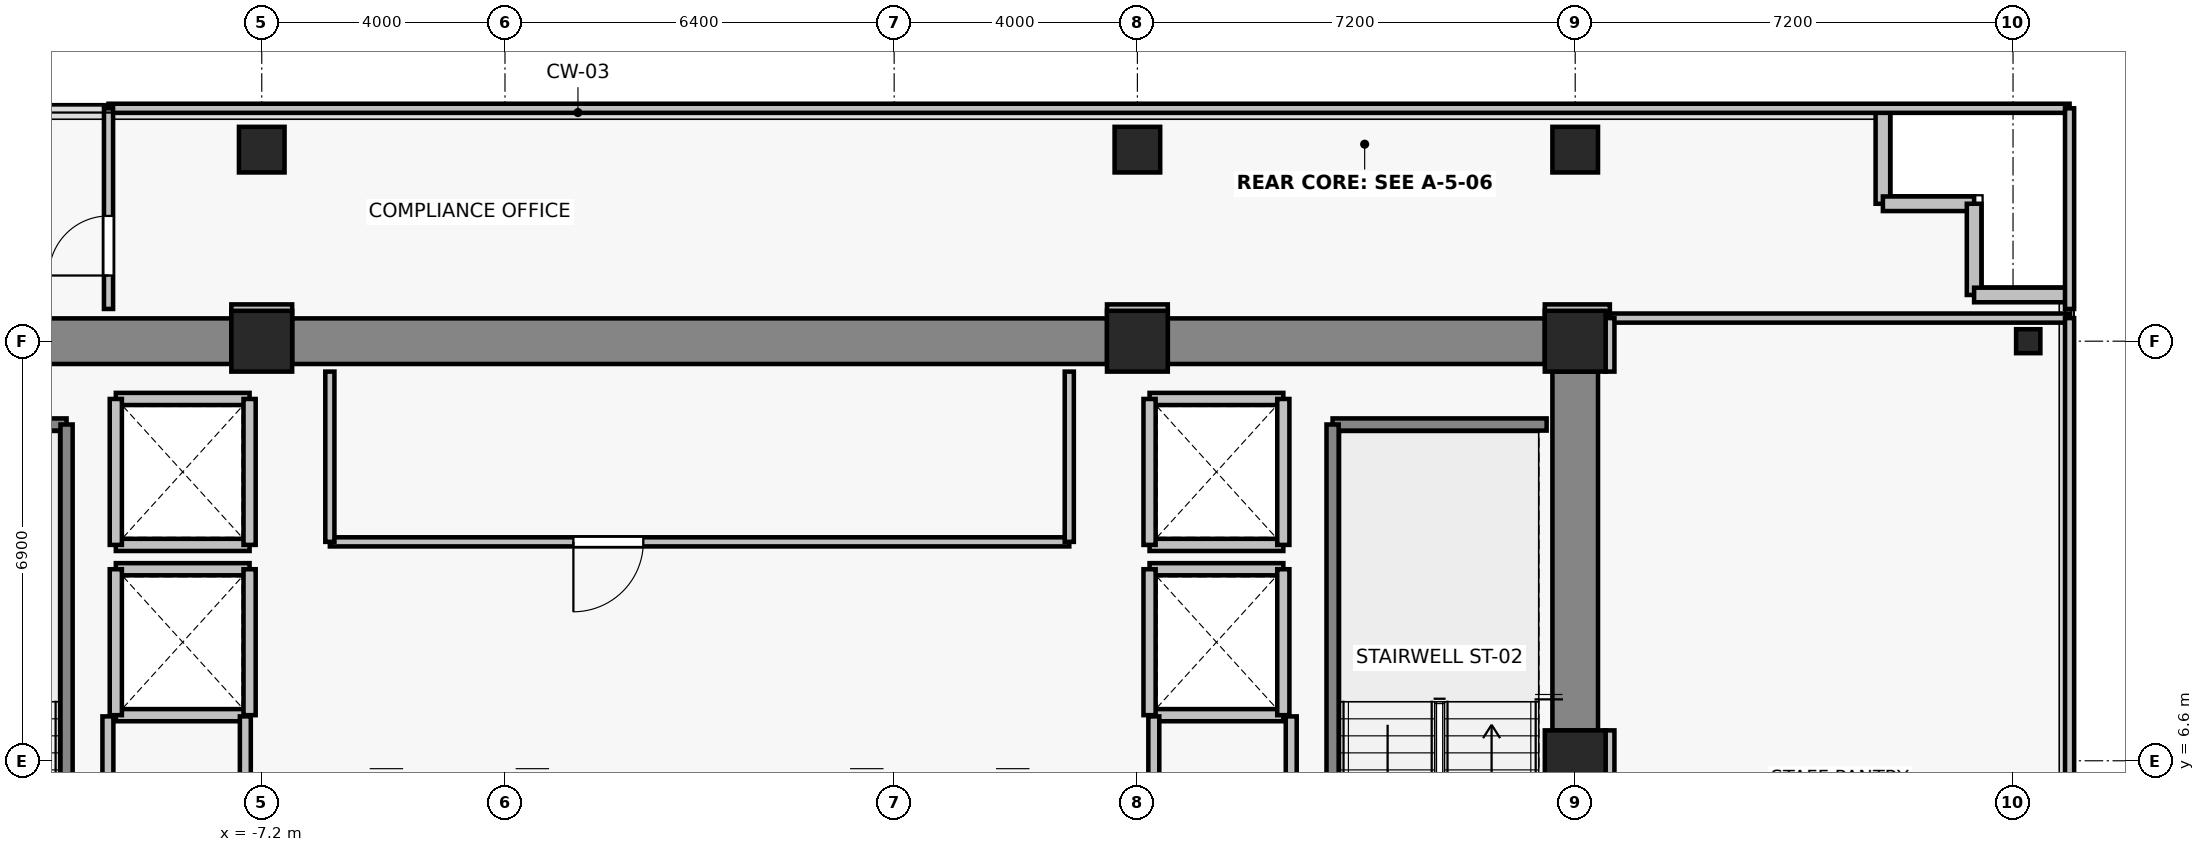
"""IFC4 building model, lengths in metres.
Left out: names, types, materials, properties, quantities, classifications, styles, units other than length and angle.
Written with IfcOpenShell. Run it as: python <this file> out.ifc"""

import sys

from ifc_helpers import new_model, si_unit, direction, frame, frame_2d, origin, origin_2d, place, context, subcontext, project, spatial, rectangle, i_section, extrude, source, transform, mapped, element, fill, save


model = new_model("IFC4")
c1 = context("Model", 3, precision=1e-05, world=origin(), true_north=direction((0.0, 1.0)))
c2 = subcontext(c1, "Body", "Model", "MODEL_VIEW")
j1 = project(units=[si_unit("LENGTHUNIT", "METRE"), si_unit("PLANEANGLEUNIT", "RADIAN")], contexts=[c1])
p1 = place(None, origin())
s1 = spatial("IfcSite", under=j1, at=p1, CompositionType="ELEMENT")
p2 = place(p1, origin())
s2 = spatial("IfcBuilding", under=s1, at=p2, CompositionType="ELEMENT")
p3 = place(p2, frame((0.0, 0.0, 166.0)))
s3 = spatial("IfcBuildingStorey", under=s2, at=p3, CompositionType="ELEMENT", Elevation=166.0)
for number, where, z_axis, x_axis in (
    (1, (14.4, 6.6, 0.0), (0.0, 0.0, 1.0), (1.0, 0.0, 0.0)),
    (2, (-7.2, 13.5, 0.0), (0.0, 0.0, 1.0), (1.0, 0.0, 0.0)),
    (3, (7.2, 13.5, 0.0), (0.0, 0.0, 1.0), (1.0, 0.0, 0.0)),
    (4, (14.4, 13.5, 0.0), (0.0, 0.0, 1.0), (1.0, 0.0, 0.0)),
):
    element("IfcColumn", number, at=place(p3, frame(where, z_axis=z_axis, x_axis=x_axis)), inside=s3, PredefinedType="COLUMN", context=c2, shape_type="SweptSolid", body=[
        extrude(rectangle(XDim=1.0, YDim=1.0, at=origin_2d()), origin(), (0.0, 0.0, 1.0), 3.3),
    ])
for number, where, z_axis, x_axis in (
    (5, (-7.2, 16.65, 0.0), (0.0, 0.0, 1.0), (1.0, 0.0, 0.0)),
    (6, (7.2, 16.65, 0.0), (0.0, 0.0, 1.0), (1.0, 0.0, 0.0)),
    (7, (14.4, 16.65, 0.0), (0.0, 0.0, 1.0), (1.0, 0.0, 0.0)),
):
    element("IfcColumn", number, at=place(p3, frame(where, z_axis=z_axis, x_axis=x_axis)), inside=s3, PredefinedType="COLUMN", context=c2, shape_type="SweptSolid", body=[
        extrude(rectangle(XDim=0.75, YDim=0.75, at=origin_2d()), origin(), (0.0, 0.0, 1.0), 3.3),
    ])
p4 = place(p3, frame((21.85, 13.5, 0.0), z_axis=(0.0, 0.0, 1.0), x_axis=(1.0, 0.0, 0.0)))
e8 = element("IfcColumn", 8, at=p4, inside=s3, PredefinedType="COLUMN", context=c2, shape_type="SweptSolid", body=[
    extrude(i_section(OverallWidth=0.399, OverallDepth=0.394, WebThickness=0.023, FlangeThickness=0.037, FilletRadius=0.015, at=origin_2d()), origin(), (0.0, 0.0, 1.0), 3.3),
])
p5 = place(p3, frame((-13.9, 13.5, 0.0), z_axis=(0.0, 0.0, 1.0), x_axis=(1.0, 0.0, 0.0)))
e9 = element("IfcWall", 9, at=p5, inside=s3, PredefinedType="SHEAR", context=c2, shape_type="SweptSolid", body=[
    extrude(rectangle(XDim=6.2, YDim=0.75, at=frame_2d((3.1, 0.0))), origin(), (0.0, 0.0, 1.0), 3.075),
])
p6 = place(p3, frame((-6.7, 13.5, 0.0), z_axis=(0.0, 0.0, 1.0), x_axis=(1.0, 0.0, 0.0)))
e10 = element("IfcWall", 10, at=p6, inside=s3, PredefinedType="SHEAR", context=c2, shape_type="SweptSolid", body=[
    extrude(rectangle(XDim=13.4, YDim=0.75, at=frame_2d((6.7, 0.0))), origin(), (0.0, 0.0, 1.0), 3.075),
])
p7 = place(p3, frame((7.7, 13.5, 0.0), z_axis=(0.0, 0.0, 1.0), x_axis=(1.0, 0.0, 0.0)))
e11 = element("IfcWall", 11, at=p7, inside=s3, PredefinedType="SHEAR", context=c2, shape_type="SweptSolid", body=[
    extrude(rectangle(XDim=6.2, YDim=0.75, at=frame_2d((3.1, 0.0))), origin(), (0.0, 0.0, 1.0), 3.075),
])
p8 = place(p3, frame((14.4, 7.1, 0.0), z_axis=(0.0, 0.0, 1.0), x_axis=(0.0, 1.0, 0.0)))
e12 = element("IfcWall", 12, at=p8, inside=s3, PredefinedType="SHEAR", context=c2, shape_type="SweptSolid", body=[
    extrude(rectangle(XDim=5.9, YDim=0.75, at=frame_2d((2.95, 0.0))), origin(), (0.0, 0.0, 1.0), 3.075),
])
for number, where, z_axis, x_axis in (
    (13, (19.46, 15.76, 0.0), (0.0, 0.0, 1.0), (0.0, 1.0, 0.0)),
    (14, (20.96, 15.76, 0.0), (0.0, 0.0, 1.0), (-1.0, 0.0, 0.0)),
    (15, (20.96, 14.26, 0.0), (0.0, 0.0, 1.0), (0.0, 1.0, 0.0)),
    (16, (22.46, 14.26, 0.0), (0.0, 0.0, 1.0), (-1.0, 0.0, 0.0)),
):
    element("IfcWall", number, at=place(p3, frame(where, z_axis=z_axis, x_axis=x_axis)), inside=s3, PredefinedType="SOLIDWALL", context=c2, shape_type="SweptSolid", body=[
        extrude(rectangle(XDim=1.5, YDim=0.24, at=frame_2d((0.75, 0.0))), origin(), (0.0, 0.0, 1.0), 3.075),
    ])
for number, where, z_axis, x_axis in (
    (17, (-7.4, 7.35, 0.0), (0.0, 0.0, 1.0), (-1.0, 0.0, 0.0)),
    (18, (-9.6, 9.75, 0.0), (0.0, 0.0, 1.0), (1.0, 0.0, 0.0)),
):
    element("IfcWall", number, at=place(p3, frame(where, z_axis=z_axis, x_axis=x_axis)), inside=s3, PredefinedType="SOLIDWALL", context=c2, shape_type="SweptSolid", body=[
        extrude(rectangle(XDim=2.2, YDim=0.2, at=frame_2d((1.1, 0.0))), origin(), (0.0, 0.0, 1.0), 2.565),
    ])
p9 = place(p3, frame((-9.6, 7.35, 0.0), z_axis=(0.0, 0.0, 1.0), x_axis=(0.0, 1.0, 0.0)))
e19 = element("IfcWall", 19, at=p9, inside=s3, PredefinedType="SOLIDWALL", context=c2, shape_type="SweptSolid", body=[
    extrude(rectangle(XDim=2.4, YDim=0.2, at=frame_2d((1.2, 0.0))), origin(), (0.0, 0.0, 1.0), 3.075),
])
p10 = place(p3, frame((-7.4, 9.75, 0.0), z_axis=(0.0, 0.0, 1.0), x_axis=(0.0, -1.0, 0.0)))
e20 = element("IfcWall", 20, at=p10, inside=s3, PredefinedType="SOLIDWALL", context=c2, shape_type="SweptSolid", body=[
    extrude(rectangle(XDim=2.4, YDim=0.2, at=frame_2d((1.2, 0.0))), origin(), (0.0, 0.0, 1.0), 2.565),
])
for number, where, z_axis, x_axis in (
    (21, (-7.4, 10.15, 0.0), (0.0, 0.0, 1.0), (-1.0, 0.0, 0.0)),
    (22, (-9.6, 12.55, 0.0), (0.0, 0.0, 1.0), (1.0, 0.0, 0.0)),
):
    element("IfcWall", number, at=place(p3, frame(where, z_axis=z_axis, x_axis=x_axis)), inside=s3, PredefinedType="SOLIDWALL", context=c2, shape_type="SweptSolid", body=[
        extrude(rectangle(XDim=2.2, YDim=0.2, at=frame_2d((1.1, 0.0))), origin(), (0.0, 0.0, 1.0), 2.565),
    ])
p11 = place(p3, frame((-9.6, 10.15, 0.0), z_axis=(0.0, 0.0, 1.0), x_axis=(0.0, 1.0, 0.0)))
e23 = element("IfcWall", 23, at=p11, inside=s3, PredefinedType="SOLIDWALL", context=c2, shape_type="SweptSolid", body=[
    extrude(rectangle(XDim=2.4, YDim=0.2, at=frame_2d((1.2, 0.0))), origin(), (0.0, 0.0, 1.0), 3.075),
])
p12 = place(p3, frame((-7.4, 12.55, 0.0), z_axis=(0.0, 0.0, 1.0), x_axis=(0.0, -1.0, 0.0)))
e24 = element("IfcWall", 24, at=p12, inside=s3, PredefinedType="SOLIDWALL", context=c2, shape_type="SweptSolid", body=[
    extrude(rectangle(XDim=2.4, YDim=0.2, at=frame_2d((1.2, 0.0))), origin(), (0.0, 0.0, 1.0), 2.565),
])
for number, where, z_axis, x_axis in (
    (25, (9.6, 7.35, 0.0), (0.0, 0.0, 1.0), (-1.0, 0.0, 0.0)),
    (26, (7.4, 9.75, 0.0), (0.0, 0.0, 1.0), (1.0, 0.0, 0.0)),
):
    element("IfcWall", number, at=place(p3, frame(where, z_axis=z_axis, x_axis=x_axis)), inside=s3, PredefinedType="SOLIDWALL", context=c2, shape_type="SweptSolid", body=[
        extrude(rectangle(XDim=2.2, YDim=0.2, at=frame_2d((1.1, 0.0))), origin(), (0.0, 0.0, 1.0), 2.565),
    ])
p13 = place(p3, frame((7.4, 7.35, 0.0), z_axis=(0.0, 0.0, 1.0), x_axis=(0.0, 1.0, 0.0)))
e27 = element("IfcWall", 27, at=p13, inside=s3, PredefinedType="SOLIDWALL", context=c2, shape_type="SweptSolid", body=[
    extrude(rectangle(XDim=2.4, YDim=0.2, at=frame_2d((1.2, 0.0))), origin(), (0.0, 0.0, 1.0), 2.565),
])
p14 = place(p3, frame((9.6, 9.75, 0.0), z_axis=(0.0, 0.0, 1.0), x_axis=(0.0, -1.0, 0.0)))
e28 = element("IfcWall", 28, at=p14, inside=s3, PredefinedType="SOLIDWALL", context=c2, shape_type="SweptSolid", body=[
    extrude(rectangle(XDim=2.4, YDim=0.2, at=frame_2d((1.2, 0.0))), origin(), (0.0, 0.0, 1.0), 3.075),
])
for number, where, z_axis, x_axis in (
    (29, (9.6, 10.15, 0.0), (0.0, 0.0, 1.0), (-1.0, 0.0, 0.0)),
    (30, (7.4, 12.55, 0.0), (0.0, 0.0, 1.0), (1.0, 0.0, 0.0)),
):
    element("IfcWall", number, at=place(p3, frame(where, z_axis=z_axis, x_axis=x_axis)), inside=s3, PredefinedType="SOLIDWALL", context=c2, shape_type="SweptSolid", body=[
        extrude(rectangle(XDim=2.2, YDim=0.2, at=frame_2d((1.1, 0.0))), origin(), (0.0, 0.0, 1.0), 2.565),
    ])
p15 = place(p3, frame((7.4, 10.15, 0.0), z_axis=(0.0, 0.0, 1.0), x_axis=(0.0, 1.0, 0.0)))
e31 = element("IfcWall", 31, at=p15, inside=s3, PredefinedType="SOLIDWALL", context=c2, shape_type="SweptSolid", body=[
    extrude(rectangle(XDim=2.4, YDim=0.2, at=frame_2d((1.2, 0.0))), origin(), (0.0, 0.0, 1.0), 2.565),
])
p16 = place(p3, frame((9.6, 12.55, 0.0), z_axis=(0.0, 0.0, 1.0), x_axis=(0.0, -1.0, 0.0)))
e32 = element("IfcWall", 32, at=p16, inside=s3, PredefinedType="SOLIDWALL", context=c2, shape_type="SweptSolid", body=[
    extrude(rectangle(XDim=2.4, YDim=0.2, at=frame_2d((1.2, 0.0))), origin(), (0.0, 0.0, 1.0), 3.075),
])
p17 = place(p3, frame((-13.93, 12.13, 0.0), z_axis=(0.0, 0.0, 1.0), x_axis=(1.0, 0.0, 0.0)))
e33 = element("IfcWall", 33, at=p17, inside=s3, PredefinedType="SOLIDWALL", context=c2, shape_type="SweptSolid", body=[
    extrude(rectangle(XDim=3.52, YDim=0.2, at=frame_2d((1.76, 0.0))), origin(), (0.0, 0.0, 1.0), 3.075),
])
p18 = place(p3, frame((-10.41, 12.13, 0.0), z_axis=(0.0, 0.0, 1.0), x_axis=(0.0, -1.0, 0.0)))
e34 = element("IfcWall", 34, at=p18, inside=s3, PredefinedType="SOLIDWALL", context=c2, shape_type="SweptSolid", body=[
    extrude(rectangle(XDim=8.84, YDim=0.2, at=frame_2d((4.42, 0.0))), origin(), (0.0, 0.0, 1.0), 3.075),
])
p19 = place(p3, frame((10.41, 12.13, 0.0), z_axis=(0.0, 0.0, 1.0), x_axis=(1.0, 0.0, 0.0)))
e35 = element("IfcWall", 35, at=p19, inside=s3, PredefinedType="SOLIDWALL", context=c2, shape_type="SweptSolid", body=[
    extrude(rectangle(XDim=3.52, YDim=0.2, at=frame_2d((1.76, 0.0))), origin(), (0.0, 0.0, 1.0), 3.075),
])
p20 = place(p3, frame((10.41, 3.29, 0.0), z_axis=(0.0, 0.0, 1.0), x_axis=(0.0, 1.0, 0.0)))
e36 = element("IfcWall", 36, at=p20, inside=s3, PredefinedType="SOLIDWALL", context=c2, shape_type="SweptSolid", body=[
    extrude(rectangle(XDim=8.84, YDim=0.2, at=frame_2d((4.42, 0.0))), origin(), (0.0, 0.0, 1.0), 3.075),
])
p21 = place(p3, frame((-9.73, 6.24, 0.0), z_axis=(0.0, 0.0, 1.0), x_axis=(0.0, 1.0, 0.0)))
e37 = element("IfcWall", 37, at=p21, inside=s3, PredefinedType="PARTITIONING", context=c2, shape_type="SweptSolid", body=[
    extrude(rectangle(XDim=1.09, YDim=0.18, at=frame_2d((0.545, 0.0))), origin(), (0.0, 0.0, 1.0), 3.075),
])
for number, where, z_axis, x_axis in (
    (38, (-7.47, 7.33, 0.0), (0.0, 0.0, 1.0), (0.0, -1.0, 0.0)),
    (39, (7.47, 6.24, 0.0), (0.0, 0.0, 1.0), (0.0, 1.0, 0.0)),
):
    element("IfcWall", number, at=place(p3, frame(where, z_axis=z_axis, x_axis=x_axis)), inside=s3, PredefinedType="PARTITIONING", context=c2, shape_type="SweptSolid", body=[
        extrude(rectangle(XDim=1.09, YDim=0.18, at=frame_2d((0.545, 0.0))), origin(), (0.0, 0.0, 1.0), 2.565),
    ])
p22 = place(p3, frame((9.73, 7.33, 0.0), z_axis=(0.0, 0.0, 1.0), x_axis=(0.0, -1.0, 0.0)))
e40 = element("IfcWall", 40, at=p22, inside=s3, PredefinedType="PARTITIONING", context=c2, shape_type="SweptSolid", body=[
    extrude(rectangle(XDim=1.09, YDim=0.18, at=frame_2d((0.545, 0.0))), origin(), (0.0, 0.0, 1.0), 3.075),
])
p23 = place(p3, frame((6.08, 10.2, 0.0), z_axis=(0.0, 0.0, 1.0), x_axis=(-1.0, 0.0, 0.0)))
e41 = element("IfcWall", 41, at=p23, inside=s3, PredefinedType="PARTITIONING", context=c2, shape_type="SweptSolid", body=[
    extrude(rectangle(XDim=12.16, YDim=0.15, at=frame_2d((6.08, 0.0))), origin(), (0.0, 0.0, 1.0), 3.075),
])
p24 = place(p23, frame((7.005, 0.0, 0.0)))
e42 = element("IfcOpeningElement", 42, at=p24, cuts=e41, PredefinedType="OPENING", context=c2, shape_type="SweptSolid", body=[
    extrude(rectangle(XDim=1.15, YDim=2.15, at=frame_2d((0.575, 1.075))), frame((0.0, 0.085, 0.0), z_axis=(0.0, -1.0, 0.0), x_axis=(1.0, 0.0, 0.0)), (0.0, 0.0, 1.0), 0.17),
])
for number, where, z_axis, x_axis in (
    (43, (-6.08, 10.2, 0.0), (0.0, 0.0, 1.0), (0.0, 1.0, 0.0)),
    (44, (6.08, 13.0, 0.0), (0.0, 0.0, 1.0), (0.0, -1.0, 0.0)),
):
    element("IfcWall", number, at=place(p3, frame(where, z_axis=z_axis, x_axis=x_axis)), inside=s3, PredefinedType="PARTITIONING", context=c2, shape_type="SweptSolid", body=[
        extrude(rectangle(XDim=2.8, YDim=0.15, at=frame_2d((1.4, 0.0))), origin(), (0.0, 0.0, 1.0), 3.075),
    ])
p25 = place(p3, frame((14.97, 13.88, 0.0), z_axis=(0.0, 0.0, 1.0), x_axis=(1.0, 0.0, 0.0)))
e45 = element("IfcWall", 45, at=p25, inside=s3, PredefinedType="PARTITIONING", context=c2, shape_type="SweptSolid", body=[
    extrude(rectangle(XDim=7.56, YDim=0.15, at=frame_2d((3.78, 0.0))), origin(), (0.0, 0.0, 1.0), 3.075),
])
p26 = place(p3, frame((14.97, 6.1, 0.0), z_axis=(0.0, 0.0, 1.0), x_axis=(0.0, 1.0, 0.0)))
e46 = element("IfcWall", 46, at=p26, inside=s3, PredefinedType="PARTITIONING", context=c2, shape_type="SweptSolid", body=[
    extrude(rectangle(XDim=1.0, YDim=0.15, at=frame_2d((0.5, 0.0))), origin(), (0.0, 0.0, 1.0), 3.075),
])
p27 = place(p3, frame((14.97, 13.0, 0.0), z_axis=(0.0, 0.0, 1.0), x_axis=(0.0, 1.0, 0.0)))
e47 = element("IfcWall", 47, at=p27, inside=s3, PredefinedType="PARTITIONING", context=c2, shape_type="SweptSolid", body=[
    extrude(rectangle(XDim=0.88, YDim=0.15, at=frame_2d((0.44, 0.0))), origin(), (0.0, 0.0, 1.0), 2.565),
])
p28 = place(p3, frame((22.53, 13.88, 0.0), z_axis=(0.0, 0.0, 1.0), x_axis=(0.0, -1.0, 0.0)))
e48 = element("IfcWall", 48, at=p28, inside=s3, PredefinedType="PARTITIONING", context=c2, shape_type="SweptSolid", body=[
    extrude(rectangle(XDim=15.65, YDim=0.15, at=frame_2d((7.825, 0.0))), origin(), (0.0, 0.0, 1.0), 3.075),
])
for number, where, z_axis, x_axis in (
    (49, (-6.7, 14.03, 0.0), (0.0, 0.0, 1.0), (-1.0, 0.0, 0.0)),
    (50, (7.7, 14.03, 0.0), (0.0, 0.0, 1.0), (-1.0, 0.0, 0.0)),
):
    element("IfcWall", number, at=place(p3, frame(where, z_axis=z_axis, x_axis=x_axis)), inside=s3, PredefinedType="PARTITIONING", context=c2, shape_type="SweptSolid", body=[
        extrude(rectangle(XDim=1.0, YDim=0.15, at=frame_2d((0.5, 0.0))), origin(), (0.0, 0.0, 1.0), 2.565),
    ])
p29 = place(p3, frame((14.97, 14.03, 0.0), z_axis=(0.0, 0.0, 1.0), x_axis=(-1.0, 0.0, 0.0)))
e51 = element("IfcWall", 51, at=p29, inside=s3, PredefinedType="PARTITIONING", context=c2, shape_type="SweptSolid", body=[
    extrude(rectangle(XDim=1.07, YDim=0.15, at=frame_2d((0.535, 0.0))), origin(), (0.0, 0.0, 1.0), 2.565),
])
p30 = place(p3, frame((-9.72, 17.33, 0.0), z_axis=(0.0, 0.0, 1.0), x_axis=(1.0, 0.0, 0.0)))
e52 = element("IfcWall", 52, at=p30, inside=s3, PredefinedType="PARTITIONING", context=c2, shape_type="SweptSolid", body=[
    extrude(rectangle(XDim=32.25, YDim=0.15, at=frame_2d((16.125, 0.0))), origin(), (0.0, 0.0, 1.0), 3.075),
])
p31 = place(p3, frame((-9.72, 14.03, 0.0), z_axis=(0.0, 0.0, 1.0), x_axis=(0.0, 1.0, 0.0)))
e53 = element("IfcWall", 53, at=p31, inside=s3, PredefinedType="PARTITIONING", context=c2, shape_type="SweptSolid", body=[
    extrude(rectangle(XDim=3.3, YDim=0.15, at=frame_2d((1.65, 0.0))), origin(), (0.0, 0.0, 1.0), 2.565),
])
p32 = place(p31, frame((0.55, 0.0, 0.0)))
e54 = element("IfcOpeningElement", 54, at=p32, cuts=e53, PredefinedType="OPENING", context=c2, shape_type="SweptSolid", body=[
    extrude(rectangle(XDim=0.98, YDim=2.15, at=frame_2d((0.49, 1.075))), frame((0.0, 0.085, 0.0), z_axis=(0.0, -1.0, 0.0), x_axis=(1.0, 0.0, 0.0)), (0.0, 0.0, 1.0), 0.17),
])
p33 = place(p3, frame((22.53, 17.33, 0.0), z_axis=(0.0, 0.0, 1.0), x_axis=(0.0, -1.0, 0.0)))
e55 = element("IfcWall", 55, at=p33, inside=s3, PredefinedType="PARTITIONING", context=c2, shape_type="SweptSolid", body=[
    extrude(rectangle(XDim=3.3, YDim=0.15, at=frame_2d((1.65, 0.0))), origin(), (0.0, 0.0, 1.0), 3.075),
])
m1 = source(origin(), c2, "Body", "SweptSolid", [
    extrude(rectangle(XDim=1.15, YDim=2.15, at=frame_2d((0.575, 1.075))), frame((0.0, 0.025, 0.0), z_axis=(0.0, -1.0, 0.0), x_axis=(1.0, 0.0, 0.0)), (0.0, 0.0, 1.0), 0.05),
])
p34 = place(p24, origin())
e56 = element("IfcDoor", 56, at=p34, inside=s3, OperationType="SINGLE_SWING_RIGHT", PredefinedType="DOOR", context=c2, shape_type="MappedRepresentation", body=[
    mapped(m1, transform((0.0, 0.0, 0.0), x_axis=(1.0, 0.0, 0.0), y_axis=(0.0, 1.0, 0.0), z_axis=(0.0, 0.0, 1.0), scale=1.0)),
])
fill(e42, e56)
m2 = source(origin(), c2, "Body", "SweptSolid", [
    extrude(rectangle(XDim=0.98, YDim=2.15, at=frame_2d((0.49, 1.075))), frame((0.0, 0.025, 0.0), z_axis=(0.0, -1.0, 0.0), x_axis=(1.0, 0.0, 0.0)), (0.0, 0.0, 1.0), 0.05),
])
p35 = place(p32, origin())
e57 = element("IfcDoor", 57, at=p35, inside=s3, OperationType="SINGLE_SWING_LEFT", PredefinedType="DOOR", context=c2, shape_type="MappedRepresentation", body=[
    mapped(m2, transform((0.0, 0.0, 0.0), x_axis=(1.0, 0.0, 0.0), y_axis=(0.0, 1.0, 0.0), z_axis=(0.0, 0.0, 1.0), scale=1.0)),
])
fill(e54, e57)
save(model, sys.argv[1])
